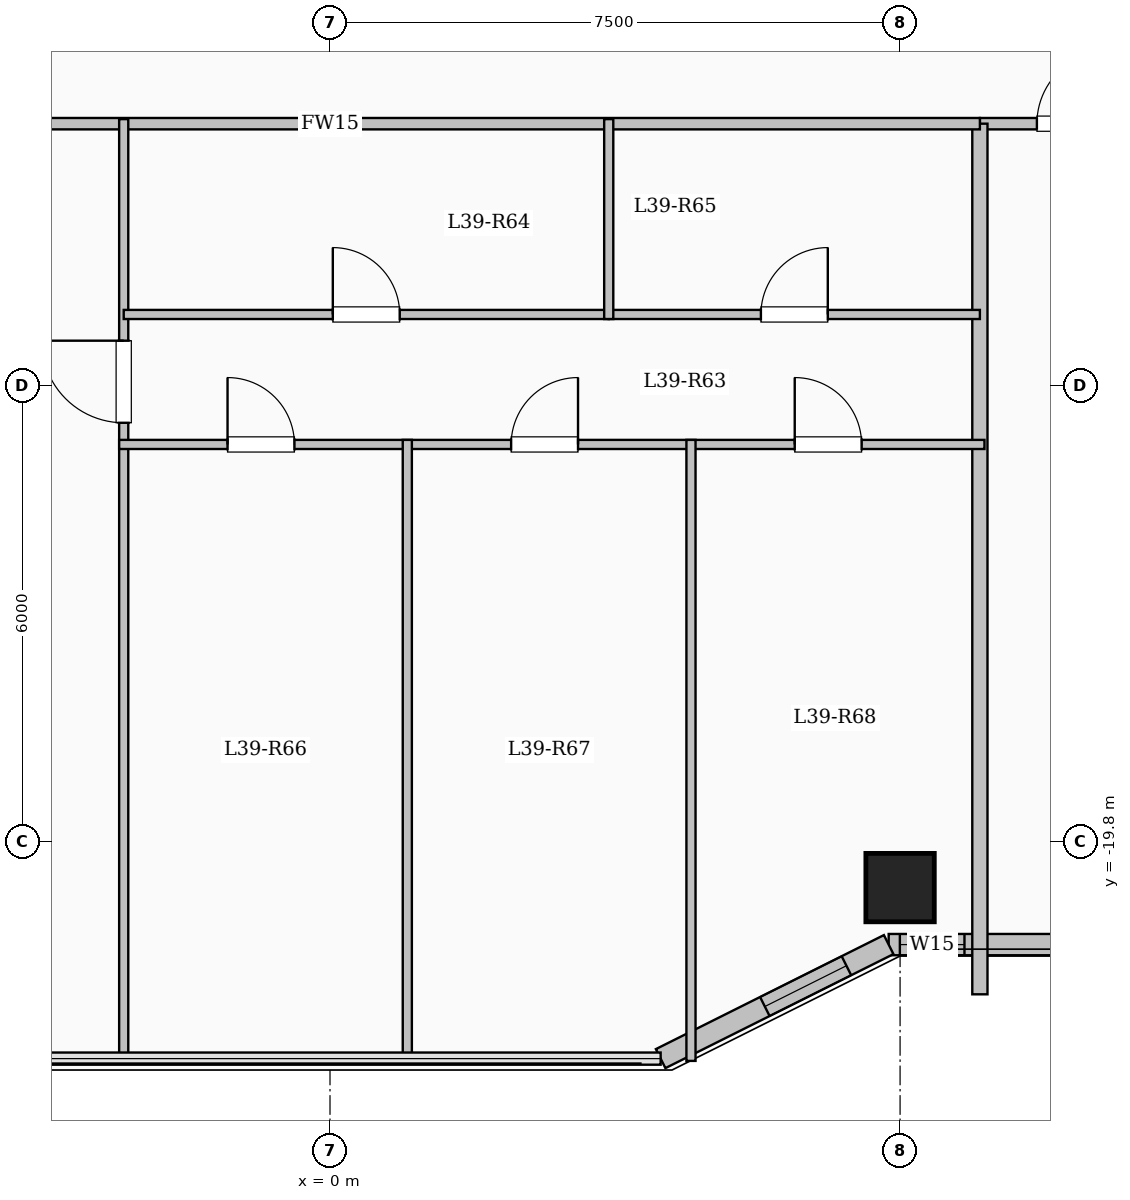
"""IFC4 building model, lengths in metres.
Left out: names, types, materials, properties, quantities, classifications, styles, units other than length and angle.
Written with IfcOpenShell. Run it as: python <this file> out.ifc"""

import sys

from ifc_helpers import new_model, si_unit, direction, frame, frame_2d, origin, origin_2d, place, context, subcontext, project, spatial, rectangle, extrude, element, fill, save


model = new_model("IFC4")
c1 = context("Model", 3, precision=1e-05, world=origin(), true_north=direction((0.0, 1.0)))
c2 = subcontext(c1, "Body", "Model", "MODEL_VIEW")
j1 = project(units=[si_unit("LENGTHUNIT", "METRE"), si_unit("PLANEANGLEUNIT", "RADIAN")], contexts=[c1])
p1 = place(None, origin())
s1 = spatial("IfcSite", under=j1, at=p1, CompositionType="ELEMENT")
p2 = place(p1, origin())
s2 = spatial("IfcBuilding", under=s1, at=p2, CompositionType="ELEMENT")
p3 = place(p2, frame((0.0, 0.0, 146.0)))
s3 = spatial("IfcBuildingStorey", under=s2, at=p3, CompositionType="ELEMENT", Elevation=146.0)
p4 = place(p3, frame((7.5, -20.4, 0.0), z_axis=(0.0, 0.0, 1.0), x_axis=(1.0, 0.0, 0.0)))
e1 = element("IfcColumn", 1, at=p4, inside=s3, PredefinedType="COLUMN", context=c2, shape_type="SweptSolid", body=[
    extrude(rectangle(XDim=0.9, YDim=0.9, at=origin_2d()), origin(), (0.0, 0.0, 1.0), 3.35),
])
p5 = place(p3, frame((19.65, -21.15, 0.0), z_axis=(0.0, 0.0, 1.0), x_axis=(-1.0, 0.0, 0.0)))
e2 = element("IfcWall", 2, at=p5, inside=s3, PredefinedType="SOLIDWALL", context=c2, shape_type="SweptSolid", body=[
    extrude(rectangle(XDim=12.3, YDim=0.28, at=frame_2d((6.15, 0.0))), origin(), (0.0, 0.0, 1.0), 3.1),
])
p6 = place(p5, frame((0.705, 0.0, 0.95)))
e3 = element("IfcOpeningElement", 3, at=p6, cuts=e2, PredefinedType="OPENING", context=c2, shape_type="SweptSolid", body=[
    extrude(rectangle(XDim=1.2, YDim=1.5, at=frame_2d((0.6, 0.75))), frame((0.0, 0.15, 0.0), z_axis=(0.0, -1.0, 0.0), x_axis=(1.0, 0.0, 0.0)), (0.0, 0.0, 1.0), 0.3),
])
p7 = place(p5, frame((3.14, 0.0, 0.95)))
e4 = element("IfcOpeningElement", 4, at=p7, cuts=e2, PredefinedType="OPENING", context=c2, shape_type="SweptSolid", body=[
    extrude(rectangle(XDim=1.2, YDim=1.5, at=frame_2d((0.6, 0.75))), frame((0.0, 0.15, 0.0), z_axis=(0.0, -1.0, 0.0), x_axis=(1.0, 0.0, 0.0)), (0.0, 0.0, 1.0), 0.3),
])
p8 = place(p5, frame((5.525, 0.0, 0.95)))
e5 = element("IfcOpeningElement", 5, at=p8, cuts=e2, PredefinedType="OPENING", context=c2, shape_type="SweptSolid", body=[
    extrude(rectangle(XDim=1.2, YDim=1.5, at=frame_2d((0.6, 0.75))), frame((0.0, 0.15, 0.0), z_axis=(0.0, -1.0, 0.0), x_axis=(1.0, 0.0, 0.0)), (0.0, 0.0, 1.0), 0.3),
])
p9 = place(p5, frame((8.362, 0.0, 0.9)))
e6 = element("IfcOpeningElement", 6, at=p9, cuts=e2, PredefinedType="OPENING", context=c2, shape_type="SweptSolid", body=[
    extrude(rectangle(XDim=1.65, YDim=1.6, at=frame_2d((0.825, 0.8))), frame((0.0, 0.15, 0.0), z_axis=(0.0, -1.0, 0.0), x_axis=(1.0, 0.0, 0.0)), (0.0, 0.0, 1.0), 0.3),
])
p10 = place(p5, frame((11.303, 0.0, 0.95)))
e7 = element("IfcOpeningElement", 7, at=p10, cuts=e2, PredefinedType="OPENING", context=c2, shape_type="SweptSolid", body=[
    extrude(rectangle(XDim=0.85, YDim=1.5, at=frame_2d((0.425, 0.75))), frame((0.0, 0.15, 0.0), z_axis=(0.0, -1.0, 0.0), x_axis=(1.0, 0.0, 0.0)), (0.0, 0.0, 1.0), 0.3),
])
p11 = place(p3, frame((7.35, -21.15, 0.0), z_axis=(0.0, 0.0, 1.0), x_axis=(-0.894427191, -0.4472135955, 0.0)))
e8 = element("IfcWall", 8, at=p11, inside=s3, PredefinedType="SOLIDWALL", context=c2, shape_type="SweptSolid", body=[
    extrude(rectangle(XDim=3.354, YDim=0.28, at=frame_2d((1.677, 0.0))), origin(), (0.0, 0.0, 1.0), 3.1),
])
p12 = place(p11, frame((0.622, 0.0, 0.95)))
e9 = element("IfcOpeningElement", 9, at=p12, cuts=e8, PredefinedType="OPENING", context=c2, shape_type="SweptSolid", body=[
    extrude(rectangle(XDim=1.2, YDim=1.5, at=frame_2d((0.6, 0.75))), frame((0.0, 0.15, 0.0), z_axis=(0.0, -1.0, 0.0), x_axis=(1.0, 0.0, 0.0)), (0.0, 0.0, 1.0), 0.3),
])
p13 = place(p3, frame((8.55, -10.35, 0.0), z_axis=(0.0, 0.0, 1.0), x_axis=(1.0, 0.0, 0.0)))
e10 = element("IfcWall", 10, at=p13, inside=s3, PredefinedType="PARTITIONING", context=c2, shape_type="SweptSolid", body=[
    extrude(rectangle(XDim=11.0, YDim=0.15, at=frame_2d((5.5, 0.0))), origin(), (0.0, 0.0, 1.0), 3.1),
])
p14 = place(p13, frame((0.75, 0.0, 0.0)))
e11 = element("IfcOpeningElement", 11, at=p14, cuts=e10, PredefinedType="OPENING", context=c2, shape_type="SweptSolid", body=[
    extrude(rectangle(XDim=0.96, YDim=2.15, at=frame_2d((0.48, 1.075))), frame((0.0, 0.085, 0.0), z_axis=(0.0, -1.0, 0.0), x_axis=(1.0, 0.0, 0.0)), (0.0, 0.0, 1.0), 0.17),
])
p15 = place(p3, frame((8.55, -21.804, 0.0), z_axis=(0.0, 0.0, 1.0), x_axis=(0.0, 1.0, 0.0)))
e12 = element("IfcWall", 12, at=p15, inside=s3, PredefinedType="SOLIDWALL", context=c2, shape_type="SweptSolid", body=[
    extrude(rectangle(XDim=11.454, YDim=0.2, at=frame_2d((5.727, 0.0))), origin(), (0.0, 0.0, 1.0), 3.1),
])
p16 = place(p3, frame((-8.55, -10.35, 0.0), z_axis=(0.0, 0.0, 1.0), x_axis=(1.0, 0.0, 0.0)))
e13 = element("IfcWall", 13, at=p16, inside=s3, PredefinedType="PARTITIONING", context=c2, shape_type="SweptSolid", body=[
    extrude(rectangle(XDim=17.1, YDim=0.15, at=frame_2d((8.55, 0.0))), origin(), (0.0, 0.0, 1.0), 3.1),
])
p17 = place(p16, frame((1.6, 0.0, 0.0)))
e14 = element("IfcOpeningElement", 14, at=p17, cuts=e13, PredefinedType="OPENING", context=c2, shape_type="SweptSolid", body=[
    extrude(rectangle(XDim=0.96, YDim=2.15, at=frame_2d((0.48, 1.075))), frame((0.0, 0.085, 0.0), z_axis=(0.0, -1.0, 0.0), x_axis=(1.0, 0.0, 0.0)), (0.0, 0.0, 1.0), 0.17),
])
p18 = place(p3, frame((-2.714, -22.68, 0.0), z_axis=(0.0, 0.0, 1.0), x_axis=(0.0, 1.0, 0.0)))
e15 = element("IfcWall", 15, at=p18, inside=s3, PredefinedType="PARTITIONING", context=c2, shape_type="SweptSolid", body=[
    extrude(rectangle(XDim=12.39, YDim=0.12, at=frame_2d((6.195, 0.0))), origin(), (0.0, 0.0, 1.0), 3.1),
])
p19 = place(p18, frame((8.395, 0.0, 0.0)))
e16 = element("IfcOpeningElement", 16, at=p19, cuts=e15, PredefinedType="OPENING", context=c2, shape_type="SweptSolid", body=[
    extrude(rectangle(XDim=1.08, YDim=2.15, at=frame_2d((0.54, 1.075))), frame((0.0, 0.07, 0.0), z_axis=(0.0, -1.0, 0.0), x_axis=(1.0, 0.0, 0.0)), (0.0, 0.0, 1.0), 0.14),
])
p20 = place(p3, frame((-2.714, -12.86, 0.0), z_axis=(0.0, 0.0, 1.0), x_axis=(1.0, 0.0, 0.0)))
e17 = element("IfcWall", 17, at=p20, inside=s3, PredefinedType="PARTITIONING", context=c2, shape_type="SweptSolid", body=[
    extrude(rectangle(XDim=6.381, YDim=0.12, at=frame_2d((3.19, 0.0))), origin(), (0.0, 0.0, 1.0), 3.1),
])
p21 = place(p20, frame((2.751, 0.0, 0.0)))
e18 = element("IfcOpeningElement", 18, at=p21, cuts=e17, PredefinedType="OPENING", context=c2, shape_type="SweptSolid", body=[
    extrude(rectangle(XDim=0.88, YDim=2.1, at=frame_2d((0.44, 1.05))), frame((0.0, 0.07, 0.0), z_axis=(0.0, -1.0, 0.0), x_axis=(1.0, 0.0, 0.0)), (0.0, 0.0, 1.0), 0.14),
])
p22 = place(p3, frame((3.667, -12.86, 0.0), z_axis=(0.0, 0.0, 1.0), x_axis=(1.0, 0.0, 0.0)))
e19 = element("IfcWall", 19, at=p22, inside=s3, PredefinedType="PARTITIONING", context=c2, shape_type="SweptSolid", body=[
    extrude(rectangle(XDim=4.883, YDim=0.12, at=frame_2d((2.441, 0.0))), origin(), (0.0, 0.0, 1.0), 3.1),
])
p23 = place(p22, frame((2.002, 0.0, 0.0)))
e20 = element("IfcOpeningElement", 20, at=p23, cuts=e19, PredefinedType="OPENING", context=c2, shape_type="SweptSolid", body=[
    extrude(rectangle(XDim=0.88, YDim=2.1, at=frame_2d((0.44, 1.05))), frame((0.0, 0.07, 0.0), z_axis=(0.0, -1.0, 0.0), x_axis=(1.0, 0.0, 0.0)), (0.0, 0.0, 1.0), 0.14),
])
p24 = place(p3, frame((-2.774, -14.57, 0.0), z_axis=(0.0, 0.0, 1.0), x_axis=(1.0, 0.0, 0.0)))
e21 = element("IfcWall", 21, at=p24, inside=s3, PredefinedType="PARTITIONING", context=c2, shape_type="SweptSolid", body=[
    extrude(rectangle(XDim=11.384, YDim=0.12, at=frame_2d((5.692, 0.0))), origin(), (0.0, 0.0, 1.0), 3.1),
])
p25 = place(p24, frame((1.426, 0.0, 0.0)))
e22 = element("IfcOpeningElement", 22, at=p25, cuts=e21, PredefinedType="OPENING", context=c2, shape_type="SweptSolid", body=[
    extrude(rectangle(XDim=0.88, YDim=2.1, at=frame_2d((0.44, 1.05))), frame((0.0, 0.07, 0.0), z_axis=(0.0, -1.0, 0.0), x_axis=(1.0, 0.0, 0.0)), (0.0, 0.0, 1.0), 0.14),
])
p26 = place(p24, frame((5.157, 0.0, 0.0)))
e23 = element("IfcOpeningElement", 23, at=p26, cuts=e21, PredefinedType="OPENING", context=c2, shape_type="SweptSolid", body=[
    extrude(rectangle(XDim=0.88, YDim=2.1, at=frame_2d((0.44, 1.05))), frame((0.0, 0.07, 0.0), z_axis=(0.0, -1.0, 0.0), x_axis=(1.0, 0.0, 0.0)), (0.0, 0.0, 1.0), 0.14),
])
p27 = place(p24, frame((8.888, 0.0, 0.0)))
e24 = element("IfcOpeningElement", 24, at=p27, cuts=e21, PredefinedType="OPENING", context=c2, shape_type="SweptSolid", body=[
    extrude(rectangle(XDim=0.88, YDim=2.1, at=frame_2d((0.44, 1.05))), frame((0.0, 0.07, 0.0), z_axis=(0.0, -1.0, 0.0), x_axis=(1.0, 0.0, 0.0)), (0.0, 0.0, 1.0), 0.14),
])
p28 = place(p3, frame((3.667, -12.92, 0.0), z_axis=(0.0, 0.0, 1.0), x_axis=(0.0, 1.0, 0.0)))
e25 = element("IfcWall", 25, at=p28, inside=s3, PredefinedType="PARTITIONING", context=c2, shape_type="SweptSolid", body=[
    extrude(rectangle(XDim=2.63, YDim=0.12, at=frame_2d((1.315, 0.0))), origin(), (0.0, 0.0, 1.0), 3.1),
])
for number, where, z_axis, x_axis in (
    (26, (1.017, -22.68, 0.0), (0.0, 0.0, 1.0), (0.0, 1.0, 0.0)),
    (27, (4.749, -22.68, 0.0), (0.0, 0.0, 1.0), (0.0, 1.0, 0.0)),
):
    element("IfcWall", number, at=place(p3, frame(where, z_axis=z_axis, x_axis=x_axis)), inside=s3, PredefinedType="PARTITIONING", context=c2, shape_type="SweptSolid", body=[
        extrude(rectangle(XDim=8.17, YDim=0.12, at=frame_2d((4.085, 0.0))), origin(), (0.0, 0.0, 1.0), 3.1),
    ])
p29 = place(p10, origin())
e28 = element("IfcWindow", 28, at=p29, inside=s3, PartitioningType="SINGLE_PANEL", PredefinedType="WINDOW", context=c2, shape_type="SweptSolid", body=[
    extrude(rectangle(XDim=0.85, YDim=1.5, at=frame_2d((0.425, 0.75))), frame((0.0, 0.03, 0.0), z_axis=(0.0, -1.0, 0.0), x_axis=(1.0, 0.0, 0.0)), (0.0, 0.0, 1.0), 0.06),
])
fill(e7, e28)
p30 = place(p12, origin())
e29 = element("IfcWindow", 29, at=p30, inside=s3, PartitioningType="SINGLE_PANEL", PredefinedType="WINDOW", context=c2, shape_type="SweptSolid", body=[
    extrude(rectangle(XDim=1.2, YDim=1.5, at=frame_2d((0.6, 0.75))), frame((0.0, 0.03, 0.0), z_axis=(0.0, -1.0, 0.0), x_axis=(1.0, 0.0, 0.0)), (0.0, 0.0, 1.0), 0.06),
])
fill(e9, e29)
p31 = place(p14, origin())
e30 = element("IfcDoor", 30, at=p31, inside=s3, OperationType="SINGLE_SWING_RIGHT", PredefinedType="DOOR", context=c2, shape_type="SweptSolid", body=[
    extrude(rectangle(XDim=0.96, YDim=2.15, at=frame_2d((0.48, 1.075))), frame((0.0, 0.025, 0.0), z_axis=(0.0, -1.0, 0.0), x_axis=(1.0, 0.0, 0.0)), (0.0, 0.0, 1.0), 0.05),
])
fill(e11, e30)
p32 = place(p19, origin())
e31 = element("IfcDoor", 31, at=p32, inside=s3, OperationType="SINGLE_SWING_RIGHT", PredefinedType="DOOR", context=c2, shape_type="SweptSolid", body=[
    extrude(rectangle(XDim=1.08, YDim=2.15, at=frame_2d((0.54, 1.075))), frame((0.0, 0.025, 0.0), z_axis=(0.0, -1.0, 0.0), x_axis=(1.0, 0.0, 0.0)), (0.0, 0.0, 1.0), 0.05),
])
fill(e16, e31)
p33 = place(p21, origin())
e32 = element("IfcDoor", 32, at=p33, inside=s3, OperationType="SINGLE_SWING_LEFT", PredefinedType="DOOR", context=c2, shape_type="SweptSolid", body=[
    extrude(rectangle(XDim=0.88, YDim=2.1, at=frame_2d((0.44, 1.05))), frame((0.0, 0.025, 0.0), z_axis=(0.0, -1.0, 0.0), x_axis=(1.0, 0.0, 0.0)), (0.0, 0.0, 1.0), 0.05),
])
fill(e18, e32)
p34 = place(p23, origin())
e33 = element("IfcDoor", 33, at=p34, inside=s3, OperationType="SINGLE_SWING_RIGHT", PredefinedType="DOOR", context=c2, shape_type="SweptSolid", body=[
    extrude(rectangle(XDim=0.88, YDim=2.1, at=frame_2d((0.44, 1.05))), frame((0.0, 0.025, 0.0), z_axis=(0.0, -1.0, 0.0), x_axis=(1.0, 0.0, 0.0)), (0.0, 0.0, 1.0), 0.05),
])
fill(e20, e33)
p35 = place(p25, origin())
e34 = element("IfcDoor", 34, at=p35, inside=s3, OperationType="SINGLE_SWING_LEFT", PredefinedType="DOOR", context=c2, shape_type="SweptSolid", body=[
    extrude(rectangle(XDim=0.88, YDim=2.1, at=frame_2d((0.44, 1.05))), frame((0.0, 0.025, 0.0), z_axis=(0.0, -1.0, 0.0), x_axis=(1.0, 0.0, 0.0)), (0.0, 0.0, 1.0), 0.05),
])
fill(e22, e34)
p36 = place(p26, origin())
e35 = element("IfcDoor", 35, at=p36, inside=s3, OperationType="SINGLE_SWING_RIGHT", PredefinedType="DOOR", context=c2, shape_type="SweptSolid", body=[
    extrude(rectangle(XDim=0.88, YDim=2.1, at=frame_2d((0.44, 1.05))), frame((0.0, 0.025, 0.0), z_axis=(0.0, -1.0, 0.0), x_axis=(1.0, 0.0, 0.0)), (0.0, 0.0, 1.0), 0.05),
])
fill(e23, e35)
p37 = place(p27, origin())
e36 = element("IfcDoor", 36, at=p37, inside=s3, OperationType="SINGLE_SWING_LEFT", PredefinedType="DOOR", context=c2, shape_type="SweptSolid", body=[
    extrude(rectangle(XDim=0.88, YDim=2.1, at=frame_2d((0.44, 1.05))), frame((0.0, 0.025, 0.0), z_axis=(0.0, -1.0, 0.0), x_axis=(1.0, 0.0, 0.0)), (0.0, 0.0, 1.0), 0.05),
])
fill(e24, e36)
save(model, sys.argv[1])
